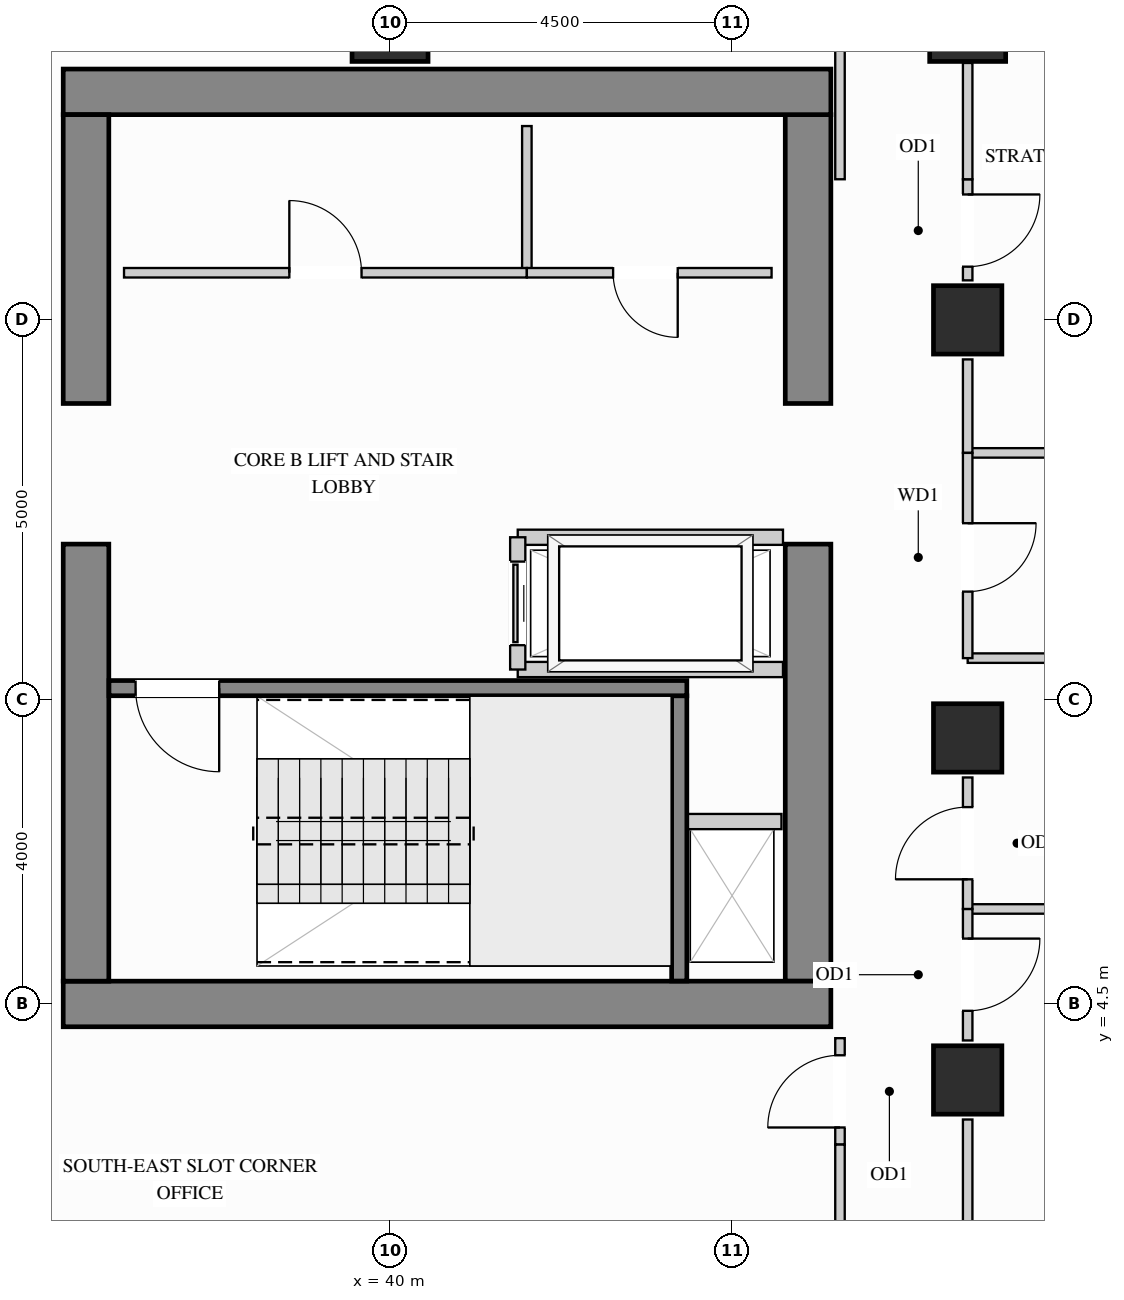
"""IFC4 building model, lengths in metres.
Left out: names, types, materials, properties, quantities, classifications, styles, units other than length and angle.
Written with IfcOpenShell. Run it as: python <this file> out.ifc"""

import sys

from ifc_helpers import new_model, si_unit, direction, frame, frame_2d, origin, origin_2d, place, context, subcontext, project, spatial, rectangle, extrude, source, transform, mapped, element, fill, save


model = new_model("IFC4")
c1 = context("Model", 3, precision=1e-05, world=origin(), true_north=direction((0.0, 1.0)))
c2 = subcontext(c1, "Body", "Model", "MODEL_VIEW")
j1 = project(units=[si_unit("LENGTHUNIT", "METRE"), si_unit("PLANEANGLEUNIT", "RADIAN")], contexts=[c1])
p1 = place(None, origin())
s1 = spatial("IfcSite", under=j1, at=p1, CompositionType="ELEMENT")
p2 = place(p1, origin())
s2 = spatial("IfcBuilding", under=s1, at=p2, CompositionType="ELEMENT")
p3 = place(p2, frame((0.0, 0.0, 153.9)))
s3 = spatial("IfcBuildingStorey", under=s2, at=p3, CompositionType="ELEMENT", Elevation=153.9)
m1 = source(origin(), c2, "Body", "SweptSolid", [
    extrude(rectangle(XDim=0.9, YDim=0.9, at=origin_2d()), origin(), (0.0, 0.0, 1.0), 3.4),
])
for number, where, z_axis, x_axis in (
    (1, (47.6, 13.5, 0.0), (0.0, 0.0, 1.0), (1.0, 0.0, 0.0)),
    (2, (47.6, 3.5, 0.0), (0.0, 0.0, 1.0), (1.0, 0.0, 0.0)),
    (3, (47.6, 8.0, 0.0), (0.0, 0.0, 1.0), (1.0, 0.0, 0.0)),
):
    element("IfcColumn", number, at=place(p3, frame(where, z_axis=z_axis, x_axis=x_axis)), inside=s3, PredefinedType="COLUMN", context=c2, shape_type="MappedRepresentation", body=[
        mapped(m1, transform((0.0, 0.0, 0.0), x_axis=(1.0, 0.0, 0.0), y_axis=(0.0, 1.0, 0.0), z_axis=(0.0, 0.0, 1.0))),
    ])
m2 = source(origin(), c2, "Body", "SweptSolid", [
    extrude(rectangle(XDim=1.0, YDim=1.0, at=origin_2d()), origin(), (0.0, 0.0, 1.0), 3.4),
])
for number, where, z_axis, x_axis in (
    (4, (40.0, 17.4, 0.0), (0.0, 0.0, 1.0), (1.0, 0.0, 0.0)),
    (5, (47.6, 17.4, 0.0), (0.0, 0.0, 1.0), (1.0, 0.0, 0.0)),
):
    element("IfcColumn", number, at=place(p3, frame(where, z_axis=z_axis, x_axis=x_axis)), inside=s3, PredefinedType="COLUMN", context=c2, shape_type="MappedRepresentation", body=[
        mapped(m2, transform((0.0, 0.0, 0.0), x_axis=(1.0, 0.0, 0.0), y_axis=(0.0, 1.0, 0.0), z_axis=(0.0, 0.0, 1.0))),
    ])
m3 = source(origin(), c2, "Body", "SweptSolid", [
    extrude(rectangle(XDim=5.75, YDim=0.6, at=frame_2d((2.875, 0.0))), origin(), (0.0, 0.0, 1.0), 3.4),
])
p4 = place(p3, frame((45.5, 4.8, 0.0), z_axis=(0.0, 0.0, 1.0), x_axis=(0.0, 1.0, 0.0)))
e6 = element("IfcWall", 6, at=p4, inside=s3, PredefinedType="SHEAR", context=c2, shape_type="MappedRepresentation", body=[
    mapped(m3, transform((0.0, 0.0, 0.0), x_axis=(1.0, 0.0, 0.0), y_axis=(0.0, 1.0, 0.0), z_axis=(0.0, 0.0, 1.0))),
])
m4 = source(origin(), c2, "Body", "SweptSolid", [
    extrude(rectangle(XDim=3.8, YDim=0.6, at=frame_2d((1.9, 0.0))), origin(), (0.0, 0.0, 1.0), 3.4),
])
p5 = place(p3, frame((45.5, 12.4, 0.0), z_axis=(0.0, 0.0, 1.0), x_axis=(0.0, 1.0, 0.0)))
e7 = element("IfcWall", 7, at=p5, inside=s3, PredefinedType="SHEAR", context=c2, shape_type="MappedRepresentation", body=[
    mapped(m4, transform((0.0, 0.0, 0.0), x_axis=(1.0, 0.0, 0.0), y_axis=(0.0, 1.0, 0.0), z_axis=(0.0, 0.0, 1.0))),
])
m5 = source(origin(), c2, "Body", "SweptSolid", [
    extrude(rectangle(XDim=10.1, YDim=0.6, at=frame_2d((5.05, 0.0))), origin(), (0.0, 0.0, 1.0), 3.4),
])
for number, where, z_axis, x_axis in (
    (8, (35.7, 16.5, 0.0), (0.0, 0.0, 1.0), (1.0, 0.0, 0.0)),
    (9, (35.7, 4.5, 0.0), (0.0, 0.0, 1.0), (1.0, 0.0, 0.0)),
):
    element("IfcWall", number, at=place(p3, frame(where, z_axis=z_axis, x_axis=x_axis)), inside=s3, PredefinedType="SHEAR", context=c2, shape_type="MappedRepresentation", body=[
        mapped(m5, transform((0.0, 0.0, 0.0), x_axis=(1.0, 0.0, 0.0), y_axis=(0.0, 1.0, 0.0), z_axis=(0.0, 0.0, 1.0))),
    ])
p6 = place(p3, frame((36.0, 4.8, 0.0), z_axis=(0.0, 0.0, 1.0), x_axis=(0.0, 1.0, 0.0)))
e10 = element("IfcWall", 10, at=p6, inside=s3, PredefinedType="SHEAR", context=c2, shape_type="MappedRepresentation", body=[
    mapped(m3, transform((0.0, 0.0, 0.0), x_axis=(1.0, 0.0, 0.0), y_axis=(0.0, 1.0, 0.0), z_axis=(0.0, 0.0, 1.0))),
])
p7 = place(p3, frame((36.0, 12.4, 0.0), z_axis=(0.0, 0.0, 1.0), x_axis=(0.0, 1.0, 0.0)))
e11 = element("IfcWall", 11, at=p7, inside=s3, PredefinedType="SHEAR", context=c2, shape_type="MappedRepresentation", body=[
    mapped(m4, transform((0.0, 0.0, 0.0), x_axis=(1.0, 0.0, 0.0), y_axis=(0.0, 1.0, 0.0), z_axis=(0.0, 0.0, 1.0))),
])
m6 = source(origin(), c2, "Body", "SweptSolid", [
    extrude(rectangle(XDim=1.93, YDim=0.125, at=frame_2d((0.965, 0.0))), origin(), (0.0, 0.0, 1.0), 3.385),
])
p8 = place(p3, frame((41.8, 14.12, 0.0), z_axis=(0.0, 0.0, 1.0), x_axis=(0.0, 1.0, 0.0)))
e12 = element("IfcWall", 12, at=p8, inside=s3, PredefinedType="PARTITIONING", context=c2, shape_type="MappedRepresentation", body=[
    mapped(m6, transform((0.0, 0.0, 0.0), x_axis=(1.0, 0.0, 0.0), y_axis=(0.0, 1.0, 0.0), z_axis=(0.0, 0.0, 1.0))),
])
p9 = place(p3, frame((36.5, 14.12, 0.0), z_axis=(0.0, 0.0, 1.0), x_axis=(1.0, 0.0, 0.0)))
e13 = element("IfcWall", 13, at=p9, inside=s3, PredefinedType="PARTITIONING", context=c2, shape_type="SweptSolid", body=[
    extrude(rectangle(XDim=5.3, YDim=0.125, at=frame_2d((2.65, 0.0))), origin(), (0.0, 0.0, 1.0), 3.385),
])
p10 = place(p9, frame((2.175, 0.0, 0.0)))
e14 = element("IfcOpeningElement", 14, at=p10, cuts=e13, PredefinedType="OPENING", context=c2, shape_type="SweptSolid", body=[
    extrude(rectangle(XDim=0.95, YDim=2.15, at=frame_2d((0.475, 1.075))), frame((0.0, 0.073, 0.0), z_axis=(0.0, -1.0, 0.0), x_axis=(1.0, 0.0, 0.0)), (0.0, 0.0, 1.0), 0.145),
])
p11 = place(p3, frame((41.8, 14.12, 0.0), z_axis=(0.0, 0.0, 1.0), x_axis=(1.0, 0.0, 0.0)))
e15 = element("IfcWall", 15, at=p11, inside=s3, PredefinedType="PARTITIONING", context=c2, shape_type="SweptSolid", body=[
    extrude(rectangle(XDim=3.22, YDim=0.125, at=frame_2d((1.61, 0.0))), origin(), (0.0, 0.0, 1.0), 3.385),
])
p12 = place(p11, frame((1.135, 0.0, 0.0)))
e16 = element("IfcOpeningElement", 16, at=p12, cuts=e15, PredefinedType="OPENING", context=c2, shape_type="SweptSolid", body=[
    extrude(rectangle(XDim=0.85, YDim=2.1, at=frame_2d((0.425, 1.05))), frame((0.0, 0.073, 0.0), z_axis=(0.0, -1.0, 0.0), x_axis=(1.0, 0.0, 0.0)), (0.0, 0.0, 1.0), 0.145),
])
m7 = source(origin(), c2, "Body", "SweptSolid", [
    extrude(rectangle(XDim=5.048, YDim=0.125, at=frame_2d((2.524, 0.0))), origin(), (0.0, 0.0, 1.0), 2.916),
])
p13 = place(p3, frame((47.6, 11.75, 0.0), z_axis=(0.0, 0.0, 1.0), x_axis=(1.0, 0.0, 0.0)))
e17 = element("IfcWall", 17, at=p13, inside=s3, PredefinedType="PARTITIONING", context=c2, shape_type="MappedRepresentation", body=[
    mapped(m7, transform((0.0, 0.0, 0.0), x_axis=(1.0, 0.0, 0.0), y_axis=(0.0, 1.0, 0.0), z_axis=(0.0, 0.0, 1.0))),
])
m8 = source(origin(), c2, "Body", "SweptSolid", [
    extrude(rectangle(XDim=5.048, YDim=0.125, at=frame_2d((2.524, 0.0))), origin(), (0.0, 0.0, 1.0), 3.385),
])
for number, where, z_axis, x_axis in (
    (18, (47.6, 5.75, 0.0), (0.0, 0.0, 1.0), (1.0, 0.0, 0.0)),
    (19, (47.6, 9.05, 0.0), (0.0, 0.0, 1.0), (1.0, 0.0, 0.0)),
):
    element("IfcWall", number, at=place(p3, frame(where, z_axis=z_axis, x_axis=x_axis)), inside=s3, PredefinedType="PARTITIONING", context=c2, shape_type="MappedRepresentation", body=[
        mapped(m8, transform((0.0, 0.0, 0.0), x_axis=(1.0, 0.0, 0.0), y_axis=(0.0, 1.0, 0.0), z_axis=(0.0, 0.0, 1.0))),
    ])
p14 = place(p3, frame((47.6, 4.02, 0.0), z_axis=(0.0, 0.0, 1.0), x_axis=(0.0, 1.0, 0.0)))
e20 = element("IfcWall", 20, at=p14, inside=s3, PredefinedType="PARTITIONING", context=c2, shape_type="SweptSolid", body=[
    extrude(rectangle(XDim=1.73, YDim=0.125, at=frame_2d((0.865, 0.0))), origin(), (0.0, 0.0, 1.0), 2.773),
])
p15 = place(p14, frame((0.39, 0.0, 0.0)))
e21 = element("IfcOpeningElement", 21, at=p15, cuts=e20, PredefinedType="OPENING", context=c2, shape_type="SweptSolid", body=[
    extrude(rectangle(XDim=0.95, YDim=2.15, at=frame_2d((0.475, 1.075))), frame((0.0, 0.073, 0.0), z_axis=(0.0, -1.0, 0.0), x_axis=(1.0, 0.0, 0.0)), (0.0, 0.0, 1.0), 0.145),
])
m9 = source(origin(), c2, "Body", "SweptSolid", [
    extrude(rectangle(XDim=1.86, YDim=0.125, at=frame_2d((0.93, 0.0))), origin(), (0.0, 0.0, 1.0), 2.773),
])
p16 = place(p3, frame((47.6, 1.12, 0.0), z_axis=(0.0, 0.0, 1.0), x_axis=(0.0, 1.0, 0.0)))
e22 = element("IfcWall", 22, at=p16, inside=s3, PredefinedType="PARTITIONING", context=c2, shape_type="MappedRepresentation", body=[
    mapped(m9, transform((0.0, 0.0, 0.0), x_axis=(1.0, 0.0, 0.0), y_axis=(0.0, 1.0, 0.0), z_axis=(0.0, 0.0, 1.0))),
])
p17 = place(p3, frame((47.6, 5.75, 0.0), z_axis=(0.0, 0.0, 1.0), x_axis=(0.0, 1.0, 0.0)))
e23 = element("IfcWall", 23, at=p17, inside=s3, PredefinedType="PARTITIONING", context=c2, shape_type="SweptSolid", body=[
    extrude(rectangle(XDim=1.73, YDim=0.125, at=frame_2d((0.865, 0.0))), origin(), (0.0, 0.0, 1.0), 2.773),
])
p18 = place(p17, frame((0.39, 0.0, 0.0)))
e24 = element("IfcOpeningElement", 24, at=p18, cuts=e23, PredefinedType="OPENING", context=c2, shape_type="SweptSolid", body=[
    extrude(rectangle(XDim=0.95, YDim=2.15, at=frame_2d((0.475, 1.075))), frame((0.0, 0.073, 0.0), z_axis=(0.0, -1.0, 0.0), x_axis=(1.0, 0.0, 0.0)), (0.0, 0.0, 1.0), 0.145),
])
m10 = source(origin(), c2, "Body", "SweptSolid", [
    extrude(rectangle(XDim=1.23, YDim=0.125, at=frame_2d((0.615, 0.0))), origin(), (0.0, 0.0, 1.0), 2.773),
])
p19 = place(p3, frame((47.6, 11.75, 0.0), z_axis=(0.0, 0.0, 1.0), x_axis=(0.0, 1.0, 0.0)))
e25 = element("IfcWall", 25, at=p19, inside=s3, PredefinedType="PARTITIONING", context=c2, shape_type="MappedRepresentation", body=[
    mapped(m10, transform((0.0, 0.0, 0.0), x_axis=(1.0, 0.0, 0.0), y_axis=(0.0, 1.0, 0.0), z_axis=(0.0, 0.0, 1.0))),
])
p20 = place(p3, frame((47.6, 14.02, 0.0), z_axis=(0.0, 0.0, 1.0), x_axis=(0.0, 1.0, 0.0)))
e26 = element("IfcWall", 26, at=p20, inside=s3, PredefinedType="PARTITIONING", context=c2, shape_type="SweptSolid", body=[
    extrude(rectangle(XDim=1.33, YDim=0.125, at=frame_2d((0.665, 0.0))), origin(), (0.0, 0.0, 1.0), 2.773),
])
p21 = place(p20, frame((0.18, 0.0, 0.0)))
e27 = element("IfcOpeningElement", 27, at=p21, cuts=e26, PredefinedType="OPENING", context=c2, shape_type="SweptSolid", body=[
    extrude(rectangle(XDim=0.95, YDim=2.15, at=frame_2d((0.475, 1.075))), frame((0.0, 0.073, 0.0), z_axis=(0.0, -1.0, 0.0), x_axis=(1.0, 0.0, 0.0)), (0.0, 0.0, 1.0), 0.145),
])
m11 = source(origin(), c2, "Body", "SweptSolid", [
    extrude(rectangle(XDim=1.53, YDim=0.125, at=frame_2d((0.765, 0.0))), origin(), (0.0, 0.0, 1.0), 2.773),
])
p22 = place(p3, frame((47.6, 15.35, 0.0), z_axis=(0.0, 0.0, 1.0), x_axis=(0.0, 1.0, 0.0)))
e28 = element("IfcWall", 28, at=p22, inside=s3, PredefinedType="PARTITIONING", context=c2, shape_type="MappedRepresentation", body=[
    mapped(m11, transform((0.0, 0.0, 0.0), x_axis=(1.0, 0.0, 0.0), y_axis=(0.0, 1.0, 0.0), z_axis=(0.0, 0.0, 1.0))),
])
p23 = place(p3, frame((47.6, 9.05, 0.0), z_axis=(0.0, 0.0, 1.0), x_axis=(0.0, 1.0, 0.0)))
e29 = element("IfcWall", 29, at=p23, inside=s3, PredefinedType="PARTITIONING", context=c2, shape_type="SweptSolid", body=[
    extrude(rectangle(XDim=2.7, YDim=0.125, at=frame_2d((1.35, 0.0))), origin(), (0.0, 0.0, 1.0), 2.773),
])
p24 = place(p23, frame((0.875, 0.0, 0.0)))
e30 = element("IfcOpeningElement", 30, at=p24, cuts=e29, PredefinedType="OPENING", context=c2, shape_type="SweptSolid", body=[
    extrude(rectangle(XDim=0.9, YDim=2.15, at=frame_2d((0.45, 1.075))), frame((0.0, 0.073, 0.0), z_axis=(0.0, -1.0, 0.0), x_axis=(1.0, 0.0, 0.0)), (0.0, 0.0, 1.0), 0.145),
])
m12 = source(origin(), c2, "Body", "SweptSolid", [
    extrude(rectangle(XDim=2.298, YDim=0.125, at=frame_2d((1.149, 0.0))), origin(), (0.0, 0.0, 1.0), 3.385),
])
p25 = place(p3, frame((45.92, 15.35, 0.0), z_axis=(0.0, 0.0, 1.0), x_axis=(0.0, 1.0, 0.0)))
e31 = element("IfcWall", 31, at=p25, inside=s3, PredefinedType="PARTITIONING", context=c2, shape_type="MappedRepresentation", body=[
    mapped(m12, transform((0.0, 0.0, 0.0), x_axis=(1.0, 0.0, 0.0), y_axis=(0.0, 1.0, 0.0), z_axis=(0.0, 0.0, 1.0))),
])
p26 = place(p3, frame((45.92, 2.65, 0.0), z_axis=(0.0, 0.0, 1.0), x_axis=(0.0, 1.0, 0.0)))
e32 = element("IfcWall", 32, at=p26, inside=s3, PredefinedType="PARTITIONING", context=c2, shape_type="SweptSolid", body=[
    extrude(rectangle(XDim=1.4, YDim=0.125, at=frame_2d((0.7, 0.0))), origin(), (0.0, 0.0, 1.0), 3.385),
])
p27 = place(p26, frame((0.225, 0.0, 0.0)))
e33 = element("IfcOpeningElement", 33, at=p27, cuts=e32, PredefinedType="OPENING", context=c2, shape_type="SweptSolid", body=[
    extrude(rectangle(XDim=0.95, YDim=2.15, at=frame_2d((0.475, 1.075))), frame((0.0, 0.073, 0.0), z_axis=(0.0, -1.0, 0.0), x_axis=(1.0, 0.0, 0.0)), (0.0, 0.0, 1.0), 0.145),
])
p28 = place(p3, frame((45.92, 0.352, 0.0), z_axis=(0.0, 0.0, 1.0), x_axis=(0.0, 1.0, 0.0)))
e34 = element("IfcWall", 34, at=p28, inside=s3, PredefinedType="PARTITIONING", context=c2, shape_type="MappedRepresentation", body=[
    mapped(m12, transform((0.0, 0.0, 0.0), x_axis=(1.0, 0.0, 0.0), y_axis=(0.0, 1.0, 0.0), z_axis=(0.0, 0.0, 1.0))),
])
m13 = source(origin(), c2, "Body", "SweptSolid", [
    extrude(rectangle(XDim=1.3, YDim=0.2, at=frame_2d((0.65, 0.0))), origin(), (0.0, 0.0, 1.0), 3.385),
])
p29 = place(p3, frame((43.85, 6.9, 0.0), z_axis=(0.0, 0.0, 1.0), x_axis=(1.0, 0.0, 0.0)))
e35 = element("IfcWall", 35, at=p29, inside=s3, PredefinedType="PARTITIONING", context=c2, shape_type="MappedRepresentation", body=[
    mapped(m13, transform((0.0, 0.0, 0.0), x_axis=(1.0, 0.0, 0.0), y_axis=(0.0, 1.0, 0.0), z_axis=(0.0, 0.0, 1.0))),
])
m14 = source(origin(), c2, "Body", "SweptSolid", [
    extrude(rectangle(XDim=3.49, YDim=0.2, at=frame_2d((1.745, 0.0))), origin(), (0.0, 0.0, 1.0), 3.385),
])
for number, where, z_axis, x_axis in (
    (36, (41.68, 10.64, 0.0), (0.0, 0.0, 1.0), (1.0, 0.0, 0.0)),
    (37, (41.68, 8.9, 0.0), (0.0, 0.0, 1.0), (1.0, 0.0, 0.0)),
):
    element("IfcWall", number, at=place(p3, frame(where, z_axis=z_axis, x_axis=x_axis)), inside=s3, PredefinedType="PARTITIONING", context=c2, shape_type="MappedRepresentation", body=[
        mapped(m14, transform((0.0, 0.0, 0.0), x_axis=(1.0, 0.0, 0.0), y_axis=(0.0, 1.0, 0.0), z_axis=(0.0, 0.0, 1.0))),
    ])
p30 = place(p3, frame((41.68, 8.9, 0.0), z_axis=(0.0, 0.0, 1.0), x_axis=(0.0, 1.0, 0.0)))
e38 = element("IfcWall", 38, at=p30, inside=s3, PredefinedType="PARTITIONING", context=c2, shape_type="SweptSolid", body=[
    extrude(rectangle(XDim=1.74, YDim=0.2, at=frame_2d((0.87, 0.0))), origin(), (0.0, 0.0, 1.0), 3.385),
])
p31 = place(p30, frame((0.32, 0.0, 0.0)))
e39 = element("IfcOpeningElement", 39, at=p31, cuts=e38, PredefinedType="OPENING", context=c2, shape_type="SweptSolid", body=[
    extrude(rectangle(XDim=1.1, YDim=2.2, at=frame_2d((0.55, 1.1))), frame((0.0, 0.11, 0.0), z_axis=(0.0, -1.0, 0.0), x_axis=(1.0, 0.0, 0.0)), (0.0, 0.0, 1.0), 0.22),
])
m15 = source(origin(), c2, "Body", "SweptSolid", [
    extrude(rectangle(XDim=3.753, YDim=0.2, at=frame_2d((1.876, 0.0))), origin(), (0.0, 0.0, 1.0), 3.4),
])
p32 = place(p3, frame((43.805, 4.802, 0.0), z_axis=(0.0, 0.0, 1.0), x_axis=(0.0, 1.0, 0.0)))
e40 = element("IfcWall", 40, at=p32, inside=s3, PredefinedType="SHEAR", context=c2, shape_type="MappedRepresentation", body=[
    mapped(m15, transform((0.0, 0.0, 0.0), x_axis=(1.0, 0.0, 0.0), y_axis=(0.0, 1.0, 0.0), z_axis=(0.0, 0.0, 1.0))),
])
p33 = place(p3, frame((36.302, 8.655, 0.0), z_axis=(0.0, 0.0, 1.0), x_axis=(1.0, 0.0, 0.0)))
e41 = element("IfcWall", 41, at=p33, inside=s3, PredefinedType="SHEAR", context=c2, shape_type="SweptSolid", body=[
    extrude(rectangle(XDim=7.603, YDim=0.2, at=frame_2d((3.802, 0.0))), origin(), (0.0, 0.0, 1.0), 3.4),
])
p34 = place(p33, frame((0.35, 0.0, 0.0)))
e42 = element("IfcOpeningElement", 42, at=p34, cuts=e41, PredefinedType="OPENING", context=c2, shape_type="SweptSolid", body=[
    extrude(rectangle(XDim=1.1, YDim=2.15, at=frame_2d((0.55, 1.075))), frame((0.0, 0.11, 0.0), z_axis=(0.0, -1.0, 0.0), x_axis=(1.0, 0.0, 0.0)), (0.0, 0.0, 1.0), 0.22),
])
m16 = source(origin(), c2, "Body", "SweptSolid", [
    extrude(rectangle(XDim=1.1, YDim=2.2, at=frame_2d((0.55, 1.1))), frame((0.0, 0.025, 0.0), z_axis=(0.0, -1.0, 0.0), x_axis=(1.0, 0.0, 0.0)), (0.0, 0.0, 1.0), 0.05),
])
p35 = place(p31, origin())
e43 = element("IfcDoor", 43, at=p35, inside=s3, OperationType="SLIDING_TO_LEFT", PredefinedType="DOOR", context=c2, shape_type="MappedRepresentation", body=[
    mapped(m16, transform((0.0, 0.0, 0.0), x_axis=(1.0, 0.0, 0.0), y_axis=(0.0, 1.0, 0.0), z_axis=(0.0, 0.0, 1.0))),
])
fill(e39, e43)
m17 = source(origin(), c2, "Body", "SweptSolid", [
    extrude(rectangle(XDim=0.95, YDim=2.15, at=frame_2d((0.475, 1.075))), frame((0.0, 0.025, 0.0), z_axis=(0.0, -1.0, 0.0), x_axis=(1.0, 0.0, 0.0)), (0.0, 0.0, 1.0), 0.05),
])
p36 = place(p10, origin())
e44 = element("IfcDoor", 44, at=p36, inside=s3, OperationType="SINGLE_SWING_LEFT", PredefinedType="DOOR", context=c2, shape_type="MappedRepresentation", body=[
    mapped(m17, transform((0.0, 0.0, 0.0), x_axis=(1.0, 0.0, 0.0), y_axis=(0.0, 1.0, 0.0), z_axis=(0.0, 0.0, 1.0))),
])
fill(e14, e44)
p37 = place(p27, origin())
e45 = element("IfcDoor", 45, at=p37, inside=s3, OperationType="SINGLE_SWING_LEFT", PredefinedType="DOOR", context=c2, shape_type="MappedRepresentation", body=[
    mapped(m17, transform((0.0, 0.0, 0.0), x_axis=(1.0, 0.0, 0.0), y_axis=(0.0, 1.0, 0.0), z_axis=(0.0, 0.0, 1.0))),
])
fill(e33, e45)
p38 = place(p15, origin())
e46 = element("IfcDoor", 46, at=p38, inside=s3, OperationType="SINGLE_SWING_RIGHT", PredefinedType="DOOR", context=c2, shape_type="MappedRepresentation", body=[
    mapped(m17, transform((0.0, 0.0, 0.0), x_axis=(1.0, 0.0, 0.0), y_axis=(0.0, 1.0, 0.0), z_axis=(0.0, 0.0, 1.0))),
])
fill(e21, e46)
p39 = place(p18, origin())
e47 = element("IfcDoor", 47, at=p39, inside=s3, OperationType="SINGLE_SWING_LEFT", PredefinedType="DOOR", context=c2, shape_type="MappedRepresentation", body=[
    mapped(m17, transform((0.0, 0.0, 0.0), x_axis=(1.0, 0.0, 0.0), y_axis=(0.0, 1.0, 0.0), z_axis=(0.0, 0.0, 1.0))),
])
fill(e24, e47)
p40 = place(p21, origin())
e48 = element("IfcDoor", 48, at=p40, inside=s3, OperationType="SINGLE_SWING_RIGHT", PredefinedType="DOOR", context=c2, shape_type="MappedRepresentation", body=[
    mapped(m17, transform((0.0, 0.0, 0.0), x_axis=(1.0, 0.0, 0.0), y_axis=(0.0, 1.0, 0.0), z_axis=(0.0, 0.0, 1.0))),
])
fill(e27, e48)
m18 = source(origin(), c2, "Body", "SweptSolid", [
    extrude(rectangle(XDim=0.85, YDim=2.1, at=frame_2d((0.425, 1.05))), frame((0.0, 0.025, 0.0), z_axis=(0.0, -1.0, 0.0), x_axis=(1.0, 0.0, 0.0)), (0.0, 0.0, 1.0), 0.05),
])
p41 = place(p12, origin())
e49 = element("IfcDoor", 49, at=p41, inside=s3, OperationType="SINGLE_SWING_RIGHT", PredefinedType="DOOR", context=c2, shape_type="MappedRepresentation", body=[
    mapped(m18, transform((0.0, 0.0, 0.0), x_axis=(1.0, 0.0, 0.0), y_axis=(0.0, 1.0, 0.0), z_axis=(0.0, 0.0, 1.0))),
])
fill(e16, e49)
m19 = source(origin(), c2, "Body", "SweptSolid", [
    extrude(rectangle(XDim=1.1, YDim=2.15, at=frame_2d((0.55, 1.075))), frame((0.0, 0.025, 0.0), z_axis=(0.0, -1.0, 0.0), x_axis=(1.0, 0.0, 0.0)), (0.0, 0.0, 1.0), 0.05),
])
p42 = place(p34, origin())
e50 = element("IfcDoor", 50, at=p42, inside=s3, OperationType="SINGLE_SWING_RIGHT", PredefinedType="DOOR", context=c2, shape_type="MappedRepresentation", body=[
    mapped(m19, transform((0.0, 0.0, 0.0), x_axis=(1.0, 0.0, 0.0), y_axis=(0.0, 1.0, 0.0), z_axis=(0.0, 0.0, 1.0))),
])
fill(e42, e50)
m20 = source(origin(), c2, "Body", "SweptSolid", [
    extrude(rectangle(XDim=0.9, YDim=2.15, at=frame_2d((0.45, 1.075))), frame((0.0, 0.025, 0.0), z_axis=(0.0, -1.0, 0.0), x_axis=(1.0, 0.0, 0.0)), (0.0, 0.0, 1.0), 0.05),
])
p43 = place(p24, origin())
e51 = element("IfcDoor", 51, at=p43, inside=s3, OperationType="SINGLE_SWING_RIGHT", PredefinedType="DOOR", context=c2, shape_type="MappedRepresentation", body=[
    mapped(m20, transform((0.0, 0.0, 0.0), x_axis=(1.0, 0.0, 0.0), y_axis=(0.0, 1.0, 0.0), z_axis=(0.0, 0.0, 1.0))),
])
fill(e30, e51)
save(model, sys.argv[1])
